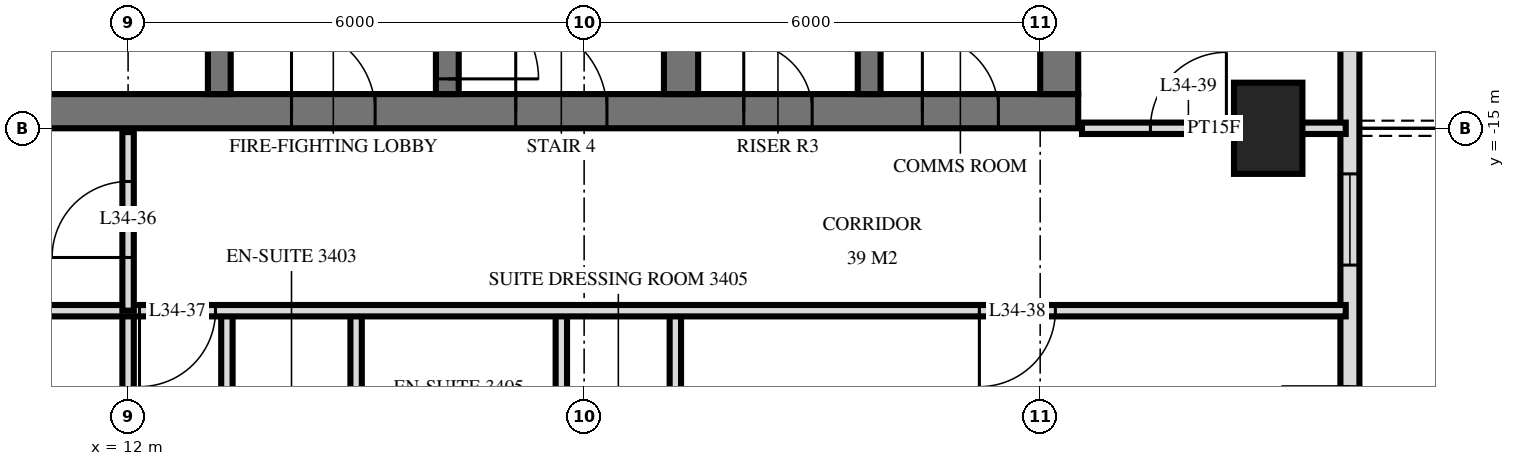
"""IFC4 building model, lengths in metres.
Left out: names, types, materials, properties, quantities, classifications, styles, units other than length and angle.
Written with IfcOpenShell. Run it as: python <this file> out.ifc"""

import sys

from ifc_helpers import new_model, si_unit, direction, frame, frame_2d, origin, origin_2d, place, context, subcontext, project, spatial, rectangle, extrude, element, fill, save


model = new_model("IFC4")
c1 = context("Model", 3, precision=1e-05, world=origin(), true_north=direction((0.0, 1.0)))
c2 = subcontext(c1, "Body", "Model", "MODEL_VIEW")
j1 = project(units=[si_unit("LENGTHUNIT", "METRE"), si_unit("PLANEANGLEUNIT", "RADIAN")], contexts=[c1])
p1 = place(None, origin())
s1 = spatial("IfcSite", under=j1, at=p1, CompositionType="ELEMENT")
p2 = place(p1, origin())
s2 = spatial("IfcBuilding", under=s1, at=p2, CompositionType="ELEMENT")
p3 = place(p2, frame((0.0, 0.0, 134.4)))
s3 = spatial("IfcBuildingStorey", under=s2, at=p3, CompositionType="ELEMENT", Elevation=134.4)
p4 = place(p3, frame((27.0, -15.0, 0.0), z_axis=(0.0, 0.0, 1.0), x_axis=(0.0, 1.0, 0.0)))
e1 = element("IfcColumn", 1, at=p4, inside=s3, PredefinedType="COLUMN", context=c2, shape_type="SweptSolid", body=[
    extrude(rectangle(XDim=1.2, YDim=0.9, at=origin_2d()), origin(), (0.0, 0.0, 1.0), 3.6),
])
p5 = place(p3, frame((10.0, -14.775, 0.0), z_axis=(0.0, 0.0, 1.0), x_axis=(1.0, 0.0, 0.0)))
e2 = element("IfcWall", 2, at=p5, inside=s3, PredefinedType="SHEAR", context=c2, shape_type="SweptSolid", body=[
    extrude(rectangle(XDim=14.5, YDim=0.45, at=frame_2d((7.25, 0.0))), origin(), (0.0, 0.0, 1.0), 3.6),
])
p6 = place(p5, frame((7.1, 0.0, 0.0)))
e3 = element("IfcOpeningElement", 3, at=p6, cuts=e2, PredefinedType="OPENING", context=c2, shape_type="SweptSolid", body=[
    extrude(rectangle(XDim=1.2, YDim=2.1, at=frame_2d((0.6, 1.05))), frame((0.0, 0.235, 0.0), z_axis=(0.0, -1.0, 0.0), x_axis=(1.0, 0.0, 0.0)), (0.0, 0.0, 1.0), 0.47),
])
p7 = place(p5, frame((4.15, 0.0, 0.0)))
e4 = element("IfcOpeningElement", 4, at=p7, cuts=e2, PredefinedType="OPENING", context=c2, shape_type="SweptSolid", body=[
    extrude(rectangle(XDim=1.1, YDim=2.1, at=frame_2d((0.55, 1.05))), frame((0.0, 0.235, 0.0), z_axis=(0.0, -1.0, 0.0), x_axis=(1.0, 0.0, 0.0)), (0.0, 0.0, 1.0), 0.47),
])
p8 = place(p5, frame((10.1, 0.0, 0.0)))
e5 = element("IfcOpeningElement", 5, at=p8, cuts=e2, PredefinedType="OPENING", context=c2, shape_type="SweptSolid", body=[
    extrude(rectangle(XDim=0.9, YDim=2.1, at=frame_2d((0.45, 1.05))), frame((0.0, 0.235, 0.0), z_axis=(0.0, -1.0, 0.0), x_axis=(1.0, 0.0, 0.0)), (0.0, 0.0, 1.0), 0.47),
])
p9 = place(p5, frame((12.45, 0.0, 0.0)))
e6 = element("IfcOpeningElement", 6, at=p9, cuts=e2, PredefinedType="OPENING", context=c2, shape_type="SweptSolid", body=[
    extrude(rectangle(XDim=1.0, YDim=2.1, at=frame_2d((0.5, 1.05))), frame((0.0, 0.235, 0.0), z_axis=(0.0, -1.0, 0.0), x_axis=(1.0, 0.0, 0.0)), (0.0, 0.0, 1.0), 0.47),
])
p10 = place(p3, frame((24.25, -14.55, 0.0), z_axis=(0.0, 0.0, 1.0), x_axis=(0.0, 1.0, 0.0)))
e7 = element("IfcWall", 7, at=p10, inside=s3, PredefinedType="SHEAR", context=c2, shape_type="SweptSolid", body=[
    extrude(rectangle(XDim=14.1, YDim=0.5, at=frame_2d((7.05, 0.0))), origin(), (0.0, 0.0, 1.0), 3.6),
])
p11 = place(p3, frame((13.2, -14.55, 0.0), z_axis=(0.0, 0.0, 1.0), x_axis=(0.0, 1.0, 0.0)))
e8 = element("IfcWall", 8, at=p11, inside=s3, PredefinedType="SHEAR", context=c2, shape_type="SweptSolid", body=[
    extrude(rectangle(XDim=5.4, YDim=0.3, at=frame_2d((2.7, 0.0))), origin(), (0.0, 0.0, 1.0), 3.6),
])
p12 = place(p11, frame((4.0, 0.0, 0.0)))
e9 = element("IfcOpeningElement", 9, at=p12, cuts=e8, PredefinedType="OPENING", context=c2, shape_type="SweptSolid", body=[
    extrude(rectangle(XDim=1.2, YDim=2.1, at=frame_2d((0.6, 1.05))), frame((0.0, 0.16, 0.0), z_axis=(0.0, -1.0, 0.0), x_axis=(1.0, 0.0, 0.0)), (0.0, 0.0, 1.0), 0.32),
])
p13 = place(p3, frame((16.2, -14.55, 0.0), z_axis=(0.0, 0.0, 1.0), x_axis=(0.0, 1.0, 0.0)))
e10 = element("IfcWall", 10, at=p13, inside=s3, PredefinedType="SHEAR", context=c2, shape_type="SweptSolid", body=[
    extrude(rectangle(XDim=5.4, YDim=0.3, at=frame_2d((2.7, 0.0))), origin(), (0.0, 0.0, 1.0), 3.6),
])
p14 = place(p13, frame((0.2, 0.0, 0.0)))
e11 = element("IfcOpeningElement", 11, at=p14, cuts=e10, PredefinedType="OPENING", context=c2, shape_type="SweptSolid", body=[
    extrude(rectangle(XDim=1.2, YDim=2.1, at=frame_2d((0.6, 1.05))), frame((0.0, 0.16, 0.0), z_axis=(0.0, -1.0, 0.0), x_axis=(1.0, 0.0, 0.0)), (0.0, 0.0, 1.0), 0.32),
])
p15 = place(p3, frame((19.275, -14.55, 0.0), z_axis=(0.0, 0.0, 1.0), x_axis=(0.0, 1.0, 0.0)))
e12 = element("IfcWall", 12, at=p15, inside=s3, PredefinedType="SHEAR", context=c2, shape_type="SweptSolid", body=[
    extrude(rectangle(XDim=5.4, YDim=0.45, at=frame_2d((2.7, 0.0))), origin(), (0.0, 0.0, 1.0), 3.6),
])
p16 = place(p3, frame((21.75, -14.55, 0.0), z_axis=(0.0, 0.0, 1.0), x_axis=(0.0, 1.0, 0.0)))
e13 = element("IfcWall", 13, at=p16, inside=s3, PredefinedType="SHEAR", context=c2, shape_type="SweptSolid", body=[
    extrude(rectangle(XDim=5.4, YDim=0.3, at=frame_2d((2.7, 0.0))), origin(), (0.0, 0.0, 1.0), 3.6),
])
p17 = place(p3, frame((28.075, -29.275, 0.0), z_axis=(0.0, 0.0, 1.0), x_axis=(0.0, 1.0, 0.0)))
e14 = element("IfcWall", 14, at=p17, inside=s3, PredefinedType="SOLIDWALL", context=c2, shape_type="SweptSolid", body=[
    extrude(rectangle(XDim=25.951, YDim=0.25, at=frame_2d((12.975, 0.0))), origin(), (0.0, 0.0, 1.0), 3.32),
])
p18 = place(p17, frame((0.575, 0.0, 0.0)))
e15 = element("IfcOpeningElement", 15, at=p18, cuts=e14, PredefinedType="OPENING", context=c2, shape_type="SweptSolid", body=[
    extrude(rectangle(XDim=1.8, YDim=2.4, at=frame_2d((0.9, 1.2))), frame((0.0, 0.135, 0.0), z_axis=(0.0, -1.0, 0.0), x_axis=(1.0, 0.0, 0.0)), (0.0, 0.0, 1.0), 0.27),
])
p19 = place(p17, frame((3.325, 0.0, 0.3)))
e16 = element("IfcOpeningElement", 16, at=p19, cuts=e14, PredefinedType="OPENING", context=c2, shape_type="SweptSolid", body=[
    extrude(rectangle(XDim=1.8, YDim=2.1, at=frame_2d((0.9, 1.05))), frame((0.0, 0.135, 0.0), z_axis=(0.0, -1.0, 0.0), x_axis=(1.0, 0.0, 0.0)), (0.0, 0.0, 1.0), 0.27),
])
p20 = place(p17, frame((5.775, 0.0, 0.3)))
e17 = element("IfcOpeningElement", 17, at=p20, cuts=e14, PredefinedType="OPENING", context=c2, shape_type="SweptSolid", body=[
    extrude(rectangle(XDim=2.4, YDim=2.1, at=frame_2d((1.2, 1.05))), frame((0.0, 0.135, 0.0), z_axis=(0.0, -1.0, 0.0), x_axis=(1.0, 0.0, 0.0)), (0.0, 0.0, 1.0), 0.27),
])
p21 = place(p17, frame((9.075, 0.0, 0.0)))
e18 = element("IfcOpeningElement", 18, at=p21, cuts=e14, PredefinedType="OPENING", context=c2, shape_type="SweptSolid", body=[
    extrude(rectangle(XDim=1.8, YDim=2.4, at=frame_2d((0.9, 1.2))), frame((0.0, 0.135, 0.0), z_axis=(0.0, -1.0, 0.0), x_axis=(1.0, 0.0, 0.0)), (0.0, 0.0, 1.0), 0.27),
])
p22 = place(p17, frame((12.475, 0.0, 0.3)))
e19 = element("IfcOpeningElement", 19, at=p22, cuts=e14, PredefinedType="OPENING", context=c2, shape_type="SweptSolid", body=[
    extrude(rectangle(XDim=1.2, YDim=2.1, at=frame_2d((0.6, 1.05))), frame((0.0, 0.135, 0.0), z_axis=(0.0, -1.0, 0.0), x_axis=(1.0, 0.0, 0.0)), (0.0, 0.0, 1.0), 0.27),
])
p23 = place(p17, frame((17.5, 0.0, 0.0)))
e20 = element("IfcOpeningElement", 20, at=p23, cuts=e14, PredefinedType="OPENING", context=c2, shape_type="SweptSolid", body=[
    extrude(rectangle(XDim=1.8, YDim=2.4, at=frame_2d((0.9, 1.2))), frame((0.0, 0.135, 0.0), z_axis=(0.0, -1.0, 0.0), x_axis=(1.0, 0.0, 0.0)), (0.0, 0.0, 1.0), 0.27),
])
p24 = place(p3, frame((19.2, -20.4, 0.0), z_axis=(0.0, 0.0, 1.0), x_axis=(0.0, 1.0, 0.0)))
e21 = element("IfcWall", 21, at=p24, inside=s3, PredefinedType="PARTITIONING", context=c2, shape_type="SweptSolid", body=[
    extrude(rectangle(XDim=3.0, YDim=0.15, at=frame_2d((1.5, 0.0))), origin(), (0.0, 0.0, 1.0), 3.32),
])
p25 = place(p24, frame((1.05, 0.0, 0.0)))
e22 = element("IfcOpeningElement", 22, at=p25, cuts=e21, PredefinedType="OPENING", context=c2, shape_type="SweptSolid", body=[
    extrude(rectangle(XDim=0.9, YDim=2.1, at=frame_2d((0.45, 1.05))), frame((0.0, 0.085, 0.0), z_axis=(0.0, -1.0, 0.0), x_axis=(1.0, 0.0, 0.0)), (0.0, 0.0, 1.0), 0.17),
])
p26 = place(p3, frame((17.7, -20.4, 0.0), z_axis=(0.0, 0.0, 1.0), x_axis=(0.0, 1.0, 0.0)))
e23 = element("IfcWall", 23, at=p26, inside=s3, PredefinedType="PARTITIONING", context=c2, shape_type="SweptSolid", body=[
    extrude(rectangle(XDim=3.0, YDim=0.15, at=frame_2d((1.5, 0.0))), origin(), (0.0, 0.0, 1.0), 3.32),
])
p27 = place(p3, frame((15.0, -33.62, 0.0), z_axis=(0.0, 0.0, 1.0), x_axis=(0.0, 1.0, 0.0)))
e24 = element("IfcWall", 24, at=p27, inside=s3, PredefinedType="PARTITIONING", context=c2, shape_type="SweptSolid", body=[
    extrude(rectangle(XDim=16.22, YDim=0.15, at=frame_2d((8.11, 0.0))), origin(), (0.0, 0.0, 1.0), 3.32),
])
p28 = place(p3, frame((13.3, -21.2, 0.0), z_axis=(0.0, 0.0, 1.0), x_axis=(0.0, 1.0, 0.0)))
e25 = element("IfcWall", 25, at=p28, inside=s3, PredefinedType="PARTITIONING", context=c2, shape_type="SweptSolid", body=[
    extrude(rectangle(XDim=3.8, YDim=0.15, at=frame_2d((1.9, 0.0))), origin(), (0.0, 0.0, 1.0), 3.32),
])
p29 = place(p28, frame((1.5, 0.0, 0.0)))
e26 = element("IfcOpeningElement", 26, at=p29, cuts=e25, PredefinedType="OPENING", context=c2, shape_type="SweptSolid", body=[
    extrude(rectangle(XDim=0.8, YDim=2.1, at=frame_2d((0.4, 1.05))), frame((0.0, 0.085, 0.0), z_axis=(0.0, -1.0, 0.0), x_axis=(1.0, 0.0, 0.0)), (0.0, 0.0, 1.0), 0.17),
])
p30 = place(p3, frame((12.0, -17.4, 0.0), z_axis=(0.0, 0.0, 1.0), x_axis=(0.0, 1.0, 0.0)))
e27 = element("IfcWall", 27, at=p30, inside=s3, PredefinedType="PARTITIONING", context=c2, shape_type="SweptSolid", body=[
    extrude(rectangle(XDim=2.35, YDim=0.15, at=frame_2d((1.175, 0.0))), origin(), (0.0, 0.0, 1.0), 3.32),
])
p31 = place(p30, frame((0.7, 0.0, 0.0)))
e28 = element("IfcOpeningElement", 28, at=p31, cuts=e27, PredefinedType="OPENING", context=c2, shape_type="SweptSolid", body=[
    extrude(rectangle(XDim=1.0, YDim=2.1, at=frame_2d((0.5, 1.05))), frame((0.0, 0.085, 0.0), z_axis=(0.0, -1.0, 0.0), x_axis=(1.0, 0.0, 0.0)), (0.0, 0.0, 1.0), 0.17),
])
p32 = place(p3, frame((12.0, -33.62, 0.0), z_axis=(0.0, 0.0, 1.0), x_axis=(0.0, 1.0, 0.0)))
e29 = element("IfcWall", 29, at=p32, inside=s3, PredefinedType="PARTITIONING", context=c2, shape_type="SweptSolid", body=[
    extrude(rectangle(XDim=16.22, YDim=0.15, at=frame_2d((8.11, 0.0))), origin(), (0.0, 0.0, 1.0), 3.32),
])
p33 = place(p3, frame((-28.02, -17.4, 0.0), z_axis=(0.0, 0.0, 1.0), x_axis=(1.0, 0.0, 0.0)))
e30 = element("IfcWall", 30, at=p33, inside=s3, PredefinedType="PARTITIONING", context=c2, shape_type="SweptSolid", body=[
    extrude(rectangle(XDim=56.04, YDim=0.15, at=frame_2d((28.02, 0.0))), origin(), (0.0, 0.0, 1.0), 3.32),
])
p34 = place(p33, frame((13.17, 0.0, 0.0)))
e31 = element("IfcOpeningElement", 31, at=p34, cuts=e30, PredefinedType="OPENING", context=c2, shape_type="SweptSolid", body=[
    extrude(rectangle(XDim=1.0, YDim=2.1, at=frame_2d((0.5, 1.05))), frame((0.0, 0.085, 0.0), z_axis=(0.0, -1.0, 0.0), x_axis=(1.0, 0.0, 0.0)), (0.0, 0.0, 1.0), 0.17),
])
p35 = place(p33, frame((11.87, 0.0, 0.0)))
e32 = element("IfcOpeningElement", 32, at=p35, cuts=e30, PredefinedType="OPENING", context=c2, shape_type="SweptSolid", body=[
    extrude(rectangle(XDim=1.0, YDim=2.1, at=frame_2d((0.5, 1.05))), frame((0.0, 0.085, 0.0), z_axis=(0.0, -1.0, 0.0), x_axis=(1.0, 0.0, 0.0)), (0.0, 0.0, 1.0), 0.17),
])
p36 = place(p33, frame((2.32, 0.0, 0.0)))
e33 = element("IfcOpeningElement", 33, at=p36, cuts=e30, PredefinedType="OPENING", context=c2, shape_type="SweptSolid", body=[
    extrude(rectangle(XDim=1.0, YDim=2.1, at=frame_2d((0.5, 1.05))), frame((0.0, 0.085, 0.0), z_axis=(0.0, -1.0, 0.0), x_axis=(1.0, 0.0, 0.0)), (0.0, 0.0, 1.0), 0.17),
])
p37 = place(p33, frame((40.17, 0.0, 0.0)))
e34 = element("IfcOpeningElement", 34, at=p37, cuts=e30, PredefinedType="OPENING", context=c2, shape_type="SweptSolid", body=[
    extrude(rectangle(XDim=1.0, YDim=2.1, at=frame_2d((0.5, 1.05))), frame((0.0, 0.085, 0.0), z_axis=(0.0, -1.0, 0.0), x_axis=(1.0, 0.0, 0.0)), (0.0, 0.0, 1.0), 0.17),
])
p38 = place(p33, frame((51.22, 0.0, 0.0)))
e35 = element("IfcOpeningElement", 35, at=p38, cuts=e30, PredefinedType="OPENING", context=c2, shape_type="SweptSolid", body=[
    extrude(rectangle(XDim=1.0, YDim=2.1, at=frame_2d((0.5, 1.05))), frame((0.0, 0.085, 0.0), z_axis=(0.0, -1.0, 0.0), x_axis=(1.0, 0.0, 0.0)), (0.0, 0.0, 1.0), 0.17),
])
p39 = place(p33, frame((18.52, 0.0, 0.0)))
e36 = element("IfcOpeningElement", 36, at=p39, cuts=e30, PredefinedType="OPENING", context=c2, shape_type="SweptSolid", body=[
    extrude(rectangle(XDim=1.0, YDim=2.1, at=frame_2d((0.5, 1.05))), frame((0.0, 0.085, 0.0), z_axis=(0.0, -1.0, 0.0), x_axis=(1.0, 0.0, 0.0)), (0.0, 0.0, 1.0), 0.17),
])
p40 = place(p33, frame((26.02, 0.0, 0.0)))
e37 = element("IfcOpeningElement", 37, at=p40, cuts=e30, PredefinedType="OPENING", context=c2, shape_type="SweptSolid", body=[
    extrude(rectangle(XDim=1.0, YDim=2.1, at=frame_2d((0.5, 1.05))), frame((0.0, 0.085, 0.0), z_axis=(0.0, -1.0, 0.0), x_axis=(1.0, 0.0, 0.0)), (0.0, 0.0, 1.0), 0.17),
])
p41 = place(p33, frame((35.02, 0.0, 0.0)))
e38 = element("IfcOpeningElement", 38, at=p41, cuts=e30, PredefinedType="OPENING", context=c2, shape_type="SweptSolid", body=[
    extrude(rectangle(XDim=1.0, YDim=2.1, at=frame_2d((0.5, 1.05))), frame((0.0, 0.085, 0.0), z_axis=(0.0, -1.0, 0.0), x_axis=(1.0, 0.0, 0.0)), (0.0, 0.0, 1.0), 0.17),
])
p42 = place(p3, frame((24.55, -15.0, 0.0), z_axis=(0.0, 0.0, 1.0), x_axis=(1.0, 0.0, 0.0)))
e39 = element("IfcWall", 39, at=p42, inside=s3, PredefinedType="PARTITIONING", context=c2, shape_type="SweptSolid", body=[
    extrude(rectangle(XDim=3.47, YDim=0.15, at=frame_2d((1.735, 0.0))), origin(), (0.0, 0.0, 1.0), 3.32),
])
p43 = place(p42, frame((0.9, 0.0, 0.0)))
e40 = element("IfcOpeningElement", 40, at=p43, cuts=e39, PredefinedType="OPENING", context=c2, shape_type="SweptSolid", body=[
    extrude(rectangle(XDim=1.0, YDim=2.1, at=frame_2d((0.5, 1.05))), frame((0.0, 0.085, 0.0), z_axis=(0.0, -1.0, 0.0), x_axis=(1.0, 0.0, 0.0)), (0.0, 0.0, 1.0), 0.17),
])
p44 = place(p22, origin())
e41 = element("IfcWindow", 41, at=p44, inside=s3, PartitioningType="SINGLE_PANEL", PredefinedType="WINDOW", context=c2, shape_type="SweptSolid", body=[
    extrude(rectangle(XDim=1.2, YDim=2.1, at=frame_2d((0.6, 1.05))), frame((0.0, 0.03, 0.0), z_axis=(0.0, -1.0, 0.0), x_axis=(1.0, 0.0, 0.0)), (0.0, 0.0, 1.0), 0.06),
])
fill(e19, e41)
p45 = place(p6, origin())
e42 = element("IfcDoor", 42, at=p45, inside=s3, OperationType="SINGLE_SWING_RIGHT", PredefinedType="DOOR", context=c2, shape_type="SweptSolid", body=[
    extrude(rectangle(XDim=1.2, YDim=2.1, at=frame_2d((0.6, 1.05))), frame((0.0, 0.025, 0.0), z_axis=(0.0, -1.0, 0.0), x_axis=(1.0, 0.0, 0.0)), (0.0, 0.0, 1.0), 0.05),
])
fill(e3, e42)
p46 = place(p7, origin())
e43 = element("IfcDoor", 43, at=p46, inside=s3, OperationType="SINGLE_SWING_RIGHT", PredefinedType="DOOR", context=c2, shape_type="SweptSolid", body=[
    extrude(rectangle(XDim=1.1, YDim=2.1, at=frame_2d((0.55, 1.05))), frame((0.0, 0.025, 0.0), z_axis=(0.0, -1.0, 0.0), x_axis=(1.0, 0.0, 0.0)), (0.0, 0.0, 1.0), 0.05),
])
fill(e4, e43)
p47 = place(p8, origin())
e44 = element("IfcDoor", 44, at=p47, inside=s3, OperationType="SINGLE_SWING_RIGHT", PredefinedType="DOOR", context=c2, shape_type="SweptSolid", body=[
    extrude(rectangle(XDim=0.9, YDim=2.1, at=frame_2d((0.45, 1.05))), frame((0.0, 0.025, 0.0), z_axis=(0.0, -1.0, 0.0), x_axis=(1.0, 0.0, 0.0)), (0.0, 0.0, 1.0), 0.05),
])
fill(e5, e44)
p48 = place(p9, origin())
e45 = element("IfcDoor", 45, at=p48, inside=s3, OperationType="SINGLE_SWING_RIGHT", PredefinedType="DOOR", context=c2, shape_type="SweptSolid", body=[
    extrude(rectangle(XDim=1.0, YDim=2.1, at=frame_2d((0.5, 1.05))), frame((0.0, 0.025, 0.0), z_axis=(0.0, -1.0, 0.0), x_axis=(1.0, 0.0, 0.0)), (0.0, 0.0, 1.0), 0.05),
])
fill(e6, e45)
p49 = place(p14, frame((0.6, 0.0, 0.0), z_axis=(0.0, 0.0, 1.0), x_axis=(-1.0, 0.0, 0.0)))
e46 = element("IfcDoor", 46, at=p49, inside=s3, OperationType="SINGLE_SWING_LEFT", PredefinedType="DOOR", context=c2, shape_type="SweptSolid", body=[
    extrude(rectangle(XDim=1.2, YDim=2.1, at=frame_2d((0.0, 1.05))), frame((0.0, -0.025, 0.0), z_axis=(0.0, 1.0, 0.0), x_axis=(-1.0, 0.0, 0.0)), (0.0, 0.0, 1.0), 0.05),
])
fill(e11, e46)
p50 = place(p31, origin())
e47 = element("IfcDoor", 47, at=p50, inside=s3, OperationType="SINGLE_SWING_RIGHT", PredefinedType="DOOR", context=c2, shape_type="SweptSolid", body=[
    extrude(rectangle(XDim=1.0, YDim=2.1, at=frame_2d((0.5, 1.05))), frame((0.0, 0.025, 0.0), z_axis=(0.0, -1.0, 0.0), x_axis=(1.0, 0.0, 0.0)), (0.0, 0.0, 1.0), 0.05),
])
fill(e28, e47)
p51 = place(p37, frame((0.5, 0.0, 0.0), z_axis=(0.0, 0.0, 1.0), x_axis=(-1.0, 0.0, 0.0)))
e48 = element("IfcDoor", 48, at=p51, inside=s3, OperationType="SINGLE_SWING_LEFT", PredefinedType="DOOR", context=c2, shape_type="SweptSolid", body=[
    extrude(rectangle(XDim=1.0, YDim=2.1, at=frame_2d((0.0, 1.05))), frame((0.0, -0.025, 0.0), z_axis=(0.0, 1.0, 0.0), x_axis=(-1.0, 0.0, 0.0)), (0.0, 0.0, 1.0), 0.05),
])
fill(e34, e48)
p52 = place(p38, frame((0.5, 0.0, 0.0), z_axis=(0.0, 0.0, 1.0), x_axis=(-1.0, 0.0, 0.0)))
e49 = element("IfcDoor", 49, at=p52, inside=s3, OperationType="SINGLE_SWING_LEFT", PredefinedType="DOOR", context=c2, shape_type="SweptSolid", body=[
    extrude(rectangle(XDim=1.0, YDim=2.1, at=frame_2d((0.0, 1.05))), frame((0.0, -0.025, 0.0), z_axis=(0.0, 1.0, 0.0), x_axis=(-1.0, 0.0, 0.0)), (0.0, 0.0, 1.0), 0.05),
])
fill(e35, e49)
p53 = place(p43, origin())
e50 = element("IfcDoor", 50, at=p53, inside=s3, OperationType="SINGLE_SWING_LEFT", PredefinedType="DOOR", context=c2, shape_type="SweptSolid", body=[
    extrude(rectangle(XDim=1.0, YDim=2.1, at=frame_2d((0.5, 1.05))), frame((0.0, 0.025, 0.0), z_axis=(0.0, -1.0, 0.0), x_axis=(1.0, 0.0, 0.0)), (0.0, 0.0, 1.0), 0.05),
])
fill(e40, e50)
save(model, sys.argv[1])
